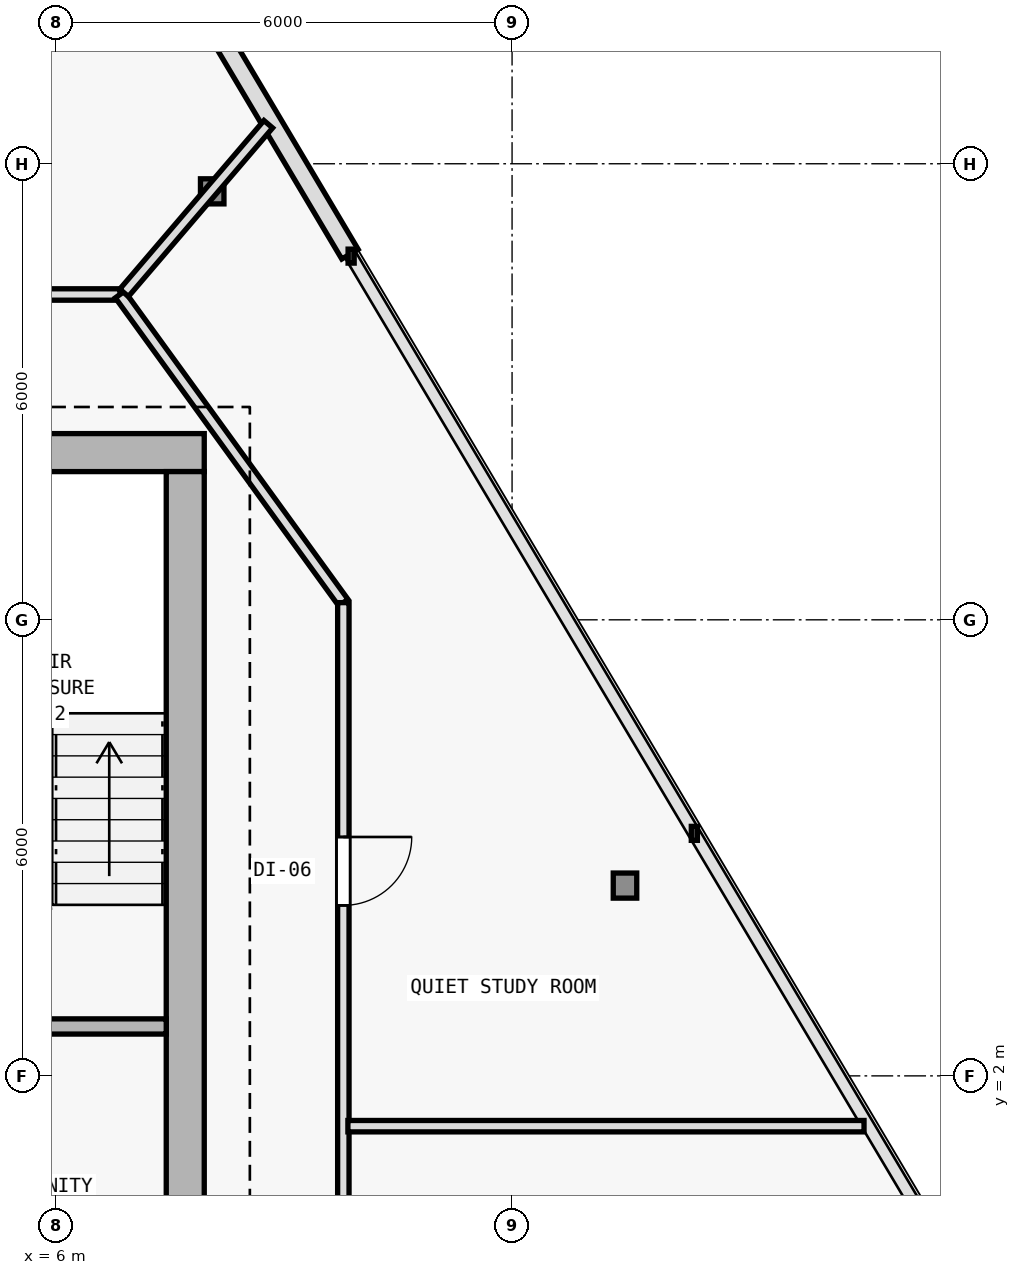
"""IFC4 building model, lengths in metres.
Left out: names, types, materials, properties, quantities, classifications, styles, units other than length and angle.
Written with IfcOpenShell. Run it as: python <this file> out.ifc"""

import sys

from ifc_helpers import new_model, si_unit, direction, frame, frame_2d, origin, origin_2d, place, context, subcontext, project, spatial, rectangle, i_section, extrude, element, fill, save


model = new_model("IFC4")
c1 = context("Model", 3, precision=1e-05, world=origin(), true_north=direction((0.0, 1.0)))
c2 = subcontext(c1, "Body", "Model", "MODEL_VIEW")
j1 = project(units=[si_unit("LENGTHUNIT", "METRE"), si_unit("PLANEANGLEUNIT", "RADIAN")], contexts=[c1])
p1 = place(None, origin())
s1 = spatial("IfcSite", under=j1, at=p1, CompositionType="ELEMENT")
p2 = place(p1, origin())
s2 = spatial("IfcBuilding", under=s1, at=p2, CompositionType="ELEMENT")
p3 = place(p2, frame((0.0, 0.0, 276.0)))
s3 = spatial("IfcBuildingStorey", under=s2, at=p3, CompositionType="ELEMENT", Elevation=276.0)
for number, where, z_axis, x_axis in (
    (1, (7.7, 10.2, 0.0), (0.0, 0.0, 1.0), (1.0, 0.0, 0.0)),
    (2, (7.7, 0.4, 0.0), (0.0, 0.0, 1.0), (1.0, 0.0, 0.0)),
):
    element("IfcColumn", number, at=place(p3, frame(where, z_axis=z_axis, x_axis=x_axis)), inside=s3, PredefinedType="COLUMN", context=c2, shape_type="SweptSolid", body=[
        extrude(i_section(OverallWidth=0.374, OverallDepth=0.372, WebThickness=0.012, FlangeThickness=0.02, FilletRadius=0.015, at=origin_2d()), origin(), (0.0, 0.0, 1.0), 3.6),
    ])
p4 = place(p3, frame((13.486, 4.503, 0.006), z_axis=(-0.019451168192, 0.009793595174, 0.999762840652), x_axis=(-0.449710241045, -0.893174506521, 0.0)))
e3 = element("IfcColumn", 3, at=p4, inside=s3, PredefinedType="COLUMN", context=c2, shape_type="SweptSolid", body=[
    extrude(i_section(OverallWidth=0.309, OverallDepth=0.33, WebThickness=0.011, FlangeThickness=0.019, FilletRadius=0.027, at=origin_2d()), origin(), (0.0, 0.0, 1.0), 3.59),
])
p5 = place(p3, frame((8.055, 13.637, 0.006), z_axis=(-0.012039903353, -0.002584838008, 0.999924176795), x_axis=(0.209906311695, -0.977721504474, 0.0)))
e4 = element("IfcColumn", 4, at=p5, inside=s3, PredefinedType="COLUMN", context=c2, shape_type="SweptSolid", body=[
    extrude(i_section(OverallWidth=0.309, OverallDepth=0.33, WebThickness=0.011, FlangeThickness=0.019, FilletRadius=0.027, at=origin_2d()), origin(), (0.0, 0.0, 1.0), 3.589),
])
p6 = place(p3, frame((5.091, 20.842, 0.0), z_axis=(0.0, 0.0, 1.0), x_axis=(0.511095217069, -0.859524100354, 0.0)))
e5 = element("IfcWall", 5, at=p6, inside=s3, PredefinedType="SOLIDWALL", context=c2, shape_type="SweptSolid", body=[
    extrude(rectangle(XDim=9.344, YDim=0.25, at=frame_2d((4.672, 0.0))), origin(), (0.0, 0.0, 1.0), 3.35),
])
p7 = place(p6, frame((3.872, 0.0, 0.62)))
e6 = element("IfcOpeningElement", 6, at=p7, cuts=e5, PredefinedType="OPENING", context=c2, shape_type="SweptSolid", body=[
    extrude(rectangle(XDim=1.6, YDim=2.1, at=frame_2d((0.8, 1.05))), frame((0.0, 0.135, 0.0), z_axis=(0.0, -1.0, 0.0), x_axis=(1.0, 0.0, 0.0)), (0.0, 0.0, 1.0), 0.27),
])
p8 = place(p3, frame((7.95, 10.2, 0.0), z_axis=(0.0, 0.0, 1.0), x_axis=(-1.0, 0.0, 0.0)))
e7 = element("IfcWall", 7, at=p8, inside=s3, PredefinedType="SHEAR", context=c2, shape_type="SweptSolid", body=[
    extrude(rectangle(XDim=15.9, YDim=0.5, at=frame_2d((7.95, 0.0))), origin(), (0.0, 0.0, 1.0), 3.35),
])
p9 = place(p8, frame((4.4, 0.0, 0.0)))
e8 = element("IfcOpeningElement", 8, at=p9, cuts=e7, PredefinedType="OPENING", context=c2, shape_type="SweptSolid", body=[
    extrude(rectangle(XDim=1.1, YDim=2.15, at=frame_2d((0.55, 1.075))), frame((0.0, 0.26, 0.0), z_axis=(0.0, -1.0, 0.0), x_axis=(1.0, 0.0, 0.0)), (0.0, 0.0, 1.0), 0.52),
])
p10 = place(p3, frame((7.7, 9.95, 0.0), z_axis=(0.0, 0.0, 1.0), x_axis=(0.0, -1.0, 0.0)))
e9 = element("IfcWall", 9, at=p10, inside=s3, PredefinedType="SHEAR", context=c2, shape_type="SweptSolid", body=[
    extrude(rectangle(XDim=19.1, YDim=0.5, at=frame_2d((9.55, 0.0))), origin(), (0.0, 0.0, 1.0), 3.35),
])
p11 = place(p3, frame((4.05, 2.65, 0.0), z_axis=(0.0, 0.0, 1.0), x_axis=(1.0, 0.0, 0.0)))
e10 = element("IfcWall", 10, at=p11, inside=s3, PredefinedType="SOLIDWALL", context=c2, shape_type="SweptSolid", body=[
    extrude(rectangle(XDim=3.4, YDim=0.2, at=frame_2d((1.7, 0.0))), origin(), (0.0, 0.0, 1.0), 3.35),
])
p12 = place(p3, frame((-6.841, 12.28, 0.0), z_axis=(0.0, 0.0, 1.0), x_axis=(1.0, 0.0, 0.0)))
e11 = element("IfcWall", 11, at=p12, inside=s3, PredefinedType="PARTITIONING", context=c2, shape_type="SweptSolid", body=[
    extrude(rectangle(XDim=13.682, YDim=0.15, at=frame_2d((6.841, 0.0))), origin(), (0.0, 0.0, 1.0), 3.015),
])
p13 = place(p12, frame((10.934, 0.0, 0.0)))
e12 = element("IfcOpeningElement", 12, at=p13, cuts=e11, PredefinedType="OPENING", context=c2, shape_type="SweptSolid", body=[
    extrude(rectangle(XDim=0.9, YDim=2.1, at=frame_2d((0.45, 1.05))), frame((0.0, 0.085, 0.0), z_axis=(0.0, -1.0, 0.0), x_axis=(1.0, 0.0, 0.0)), (0.0, 0.0, 1.0), 0.17),
])
p14 = place(p12, frame((4.677, 0.0, 0.0)))
e13 = element("IfcOpeningElement", 13, at=p14, cuts=e11, PredefinedType="OPENING", context=c2, shape_type="SweptSolid", body=[
    extrude(rectangle(XDim=0.9, YDim=2.1, at=frame_2d((0.45, 1.05))), frame((0.0, 0.085, 0.0), z_axis=(0.0, -1.0, 0.0), x_axis=(1.0, 0.0, 0.0)), (0.0, 0.0, 1.0), 0.17),
])
p15 = place(p3, frame((6.841, 12.28, 0.0), z_axis=(0.0, 0.0, 1.0), x_axis=(0.586956386413, -0.809618552436, 0.0)))
e14 = element("IfcWall", 14, at=p15, inside=s3, PredefinedType="PARTITIONING", context=c2, shape_type="SweptSolid", body=[
    extrude(rectangle(XDim=5.008, YDim=0.15, at=frame_2d((2.504, 0.0))), origin(), (0.0, 0.0, 1.0), 3.025),
])
p16 = place(p3, frame((9.78, 8.226, 0.0), z_axis=(0.0, 0.0, 1.0), x_axis=(0.0, -1.0, 0.0)))
e15 = element("IfcWall", 15, at=p16, inside=s3, PredefinedType="PARTITIONING", context=c2, shape_type="SweptSolid", body=[
    extrude(rectangle(XDim=19.706, YDim=0.15, at=frame_2d((9.853, 0.0))), origin(), (0.0, 0.0, 1.0), 2.725),
])
p17 = place(p16, frame((17.372, 0.0, 0.0)))
e16 = element("IfcOpeningElement", 16, at=p17, cuts=e15, PredefinedType="OPENING", context=c2, shape_type="SweptSolid", body=[
    extrude(rectangle(XDim=0.9, YDim=2.1, at=frame_2d((0.45, 1.05))), frame((0.0, 0.085, 0.0), z_axis=(0.0, -1.0, 0.0), x_axis=(1.0, 0.0, 0.0)), (0.0, 0.0, 1.0), 0.17),
])
p18 = place(p16, frame((14.877, 0.0, 0.0)))
e17 = element("IfcOpeningElement", 17, at=p18, cuts=e15, PredefinedType="OPENING", context=c2, shape_type="SweptSolid", body=[
    extrude(rectangle(XDim=0.85, YDim=2.1, at=frame_2d((0.425, 1.05))), frame((0.0, 0.085, 0.0), z_axis=(0.0, -1.0, 0.0), x_axis=(1.0, 0.0, 0.0)), (0.0, 0.0, 1.0), 0.17),
])
p19 = place(p16, frame((13.228, 0.0, 0.0)))
e18 = element("IfcOpeningElement", 18, at=p19, cuts=e15, PredefinedType="OPENING", context=c2, shape_type="SweptSolid", body=[
    extrude(rectangle(XDim=0.85, YDim=2.1, at=frame_2d((0.425, 1.05))), frame((0.0, 0.085, 0.0), z_axis=(0.0, -1.0, 0.0), x_axis=(1.0, 0.0, 0.0)), (0.0, 0.0, 1.0), 0.17),
])
p20 = place(p16, frame((9.402, 0.0, 0.0)))
e19 = element("IfcOpeningElement", 19, at=p20, cuts=e15, PredefinedType="OPENING", context=c2, shape_type="SweptSolid", body=[
    extrude(rectangle(XDim=0.9, YDim=2.1, at=frame_2d((0.45, 1.05))), frame((0.0, 0.085, 0.0), z_axis=(0.0, -1.0, 0.0), x_axis=(1.0, 0.0, 0.0)), (0.0, 0.0, 1.0), 0.17),
])
p21 = place(p16, frame((3.083, 0.0, 0.0)))
e20 = element("IfcOpeningElement", 20, at=p21, cuts=e15, PredefinedType="OPENING", context=c2, shape_type="SweptSolid", body=[
    extrude(rectangle(XDim=0.9, YDim=2.1, at=frame_2d((0.45, 1.05))), frame((0.0, 0.085, 0.0), z_axis=(0.0, -1.0, 0.0), x_axis=(1.0, 0.0, 0.0)), (0.0, 0.0, 1.0), 0.17),
])
p22 = place(p3, frame((6.895, 12.302, 0.0), z_axis=(0.0, 0.0, 1.0), x_axis=(0.65001263213, 0.759923402766, 0.0)))
e21 = element("IfcWall", 21, at=p22, inside=s3, PredefinedType="PARTITIONING", context=c2, shape_type="SweptSolid", body=[
    extrude(rectangle(XDim=2.919, YDim=0.15, at=frame_2d((1.459, 0.0))), origin(), (0.0, 0.0, 1.0), 3.015),
])
p23 = place(p3, frame((9.84, 1.338, 0.0), z_axis=(0.0, 0.0, 1.0), x_axis=(1.0, 0.0, 0.0)))
e22 = element("IfcWall", 22, at=p23, inside=s3, PredefinedType="PARTITIONING", context=c2, shape_type="SweptSolid", body=[
    extrude(rectangle(XDim=6.791, YDim=0.15, at=frame_2d((3.395, 0.0))), origin(), (0.0, 0.0, 1.0), 3.015),
])
p24 = place(p21, origin())
e23 = element("IfcDoor", 23, at=p24, inside=s3, OperationType="SINGLE_SWING_LEFT", PredefinedType="DOOR", context=c2, shape_type="SweptSolid", body=[
    extrude(rectangle(XDim=0.9, YDim=2.1, at=frame_2d((0.45, 1.05))), frame((0.0, 0.025, 0.0), z_axis=(0.0, -1.0, 0.0), x_axis=(1.0, 0.0, 0.0)), (0.0, 0.0, 1.0), 0.05),
])
fill(e20, e23)
save(model, sys.argv[1])
